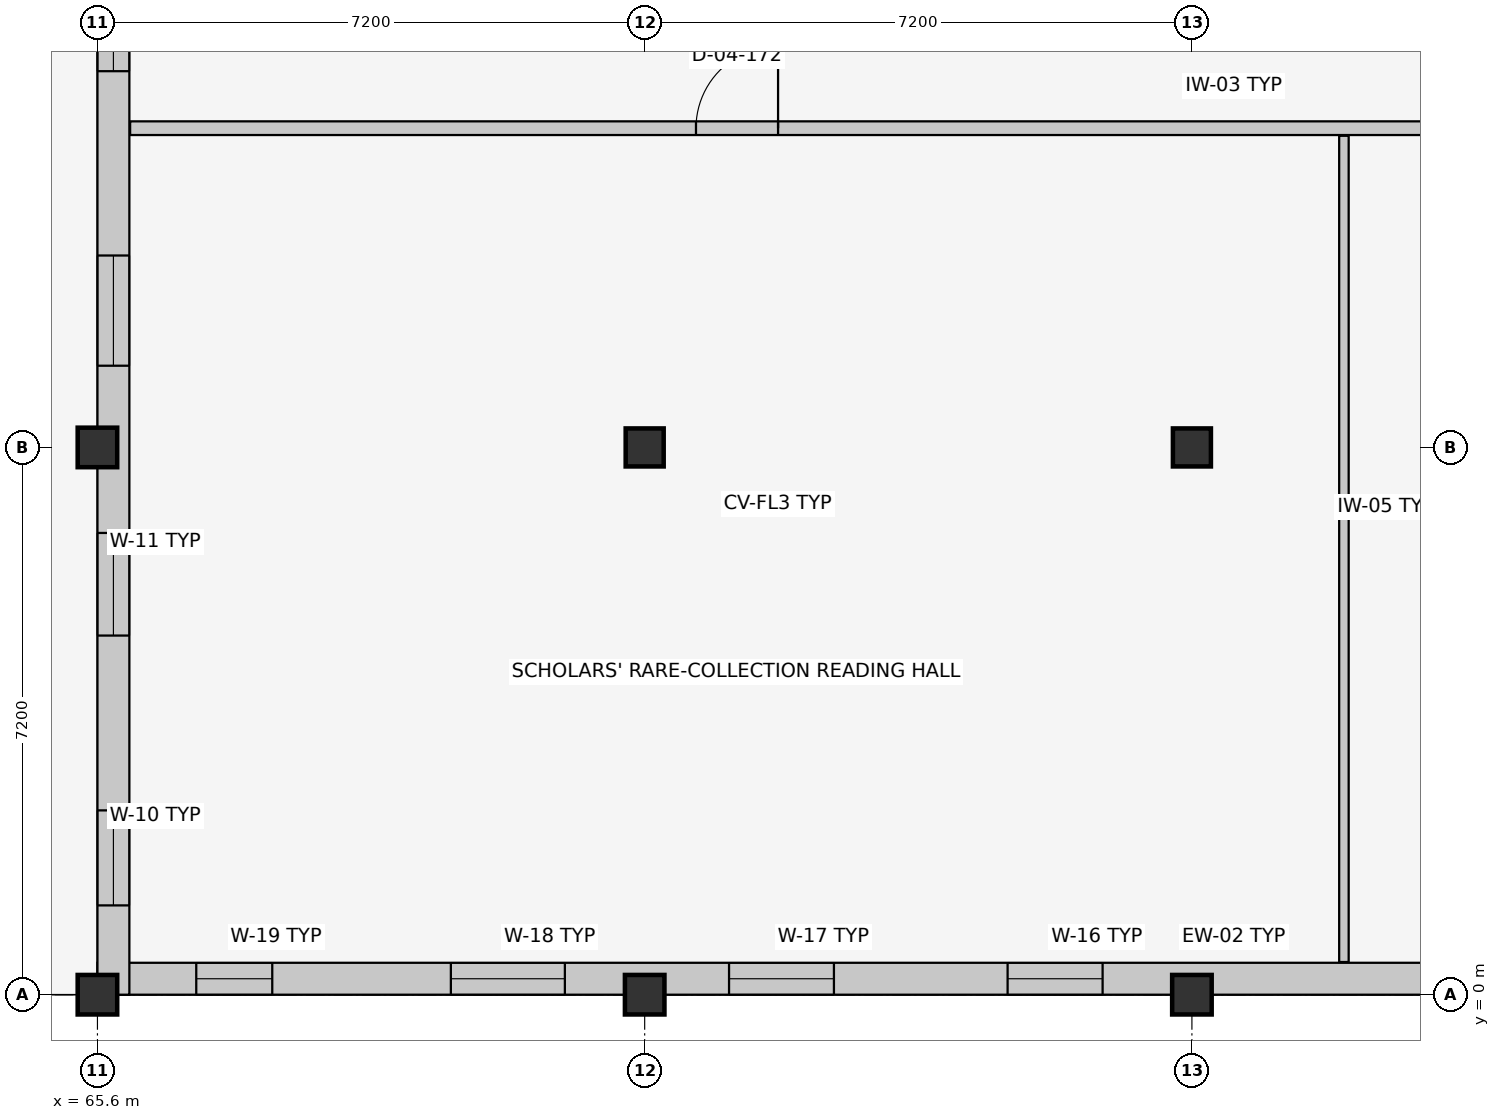
"""IFC4 building model, lengths in metres.
Left out: names, types, materials, properties, quantities, classifications, styles, units other than length and angle.
Written with IfcOpenShell. Run it as: python <this file> out.ifc"""

import sys

from ifc_helpers import new_model, si_unit, direction, frame, frame_2d, origin, origin_2d, place, context, subcontext, project, spatial, rectangle, extrude, element, fill, save


model = new_model("IFC4")
c1 = context("Model", 3, precision=1e-05, world=origin(), true_north=direction((0.0, 1.0)))
c2 = subcontext(c1, "Body", "Model", "MODEL_VIEW")
j1 = project(units=[si_unit("LENGTHUNIT", "METRE"), si_unit("PLANEANGLEUNIT", "RADIAN")], contexts=[c1])
p1 = place(None, origin())
s1 = spatial("IfcSite", under=j1, at=p1, CompositionType="ELEMENT")
p2 = place(p1, origin())
s2 = spatial("IfcBuilding", under=s1, at=p2, CompositionType="ELEMENT")
p3 = place(p2, frame((0.0, 0.0, 18.0)))
s3 = spatial("IfcBuildingStorey", under=s2, at=p3, CompositionType="ELEMENT", Elevation=18.0)
for number, where, z_axis, x_axis in (
    (1, (65.6, 0.0, 0.0), (0.0, 0.0, 1.0), (1.0, 0.0, 0.0)),
    (2, (65.6, 7.2, 0.0), (0.0, 0.0, 1.0), (1.0, 0.0, 0.0)),
    (3, (72.8, 0.0, 0.0), (0.0, 0.0, 1.0), (1.0, 0.0, 0.0)),
):
    element("IfcColumn", number, at=place(p3, frame(where, z_axis=z_axis, x_axis=x_axis)), inside=s3, PredefinedType="COLUMN", context=c2, shape_type="SweptSolid", body=[
        extrude(rectangle(XDim=0.52, YDim=0.52, at=origin_2d()), origin(), (0.0, 0.0, 1.0), 3.9),
    ])
p4 = place(p3, frame((72.8, 7.2, 0.0), z_axis=(0.0, 0.0, 1.0), x_axis=(1.0, 0.0, 0.0)))
e4 = element("IfcColumn", 4, at=p4, inside=s3, PredefinedType="COLUMN", context=c2, shape_type="SweptSolid", body=[
    extrude(rectangle(XDim=0.5, YDim=0.5, at=origin_2d()), origin(), (0.0, 0.0, 1.0), 3.9),
])
p5 = place(p3, frame((80.0, 0.0, 0.0), z_axis=(0.0, 0.0, 1.0), x_axis=(1.0, 0.0, 0.0)))
e5 = element("IfcColumn", 5, at=p5, inside=s3, PredefinedType="COLUMN", context=c2, shape_type="SweptSolid", body=[
    extrude(rectangle(XDim=0.52, YDim=0.52, at=origin_2d()), origin(), (0.0, 0.0, 1.0), 3.9),
])
p6 = place(p3, frame((80.0, 7.2, 0.0), z_axis=(0.0, 0.0, 1.0), x_axis=(1.0, 0.0, 0.0)))
e6 = element("IfcColumn", 6, at=p6, inside=s3, PredefinedType="COLUMN", context=c2, shape_type="SweptSolid", body=[
    extrude(rectangle(XDim=0.5, YDim=0.5, at=origin_2d()), origin(), (0.0, 0.0, 1.0), 3.9),
])
p7 = place(p3, frame((94.4, 0.21, 0.0), z_axis=(0.0, 0.0, 1.0), x_axis=(-1.0, 0.0, 0.0)))
e7 = element("IfcWall", 7, at=p7, inside=s3, PredefinedType="SOLIDWALL", context=c2, shape_type="SweptSolid", body=[
    extrude(rectangle(XDim=28.8, YDim=0.42, at=frame_2d((14.4, 0.0))), origin(), (0.0, 0.0, 1.0), 2.955),
])
p8 = place(p7, frame((1.075, 0.0, 0.9)))
e8 = element("IfcOpeningElement", 8, at=p8, cuts=e7, PredefinedType="OPENING", context=c2, shape_type="SweptSolid", body=[
    extrude(rectangle(XDim=1.45, YDim=1.45, at=frame_2d((0.725, 0.725))), frame((0.0, 0.222, 0.0), z_axis=(0.0, -1.0, 0.0), x_axis=(1.0, 0.0, 0.0)), (0.0, 0.0, 1.0), 0.444),
])
p9 = place(p7, frame((4.95, 0.0, 0.9)))
e9 = element("IfcOpeningElement", 9, at=p9, cuts=e7, PredefinedType="OPENING", context=c2, shape_type="SweptSolid", body=[
    extrude(rectangle(XDim=0.9, YDim=1.6, at=frame_2d((0.45, 0.8))), frame((0.0, 0.222, 0.0), z_axis=(0.0, -1.0, 0.0), x_axis=(1.0, 0.0, 0.0)), (0.0, 0.0, 1.0), 0.444),
])
p10 = place(p7, frame((8.475, 0.0, 0.9)))
e10 = element("IfcOpeningElement", 10, at=p10, cuts=e7, PredefinedType="OPENING", context=c2, shape_type="SweptSolid", body=[
    extrude(rectangle(XDim=1.05, YDim=1.6, at=frame_2d((0.525, 0.8))), frame((0.0, 0.222, 0.0), z_axis=(0.0, -1.0, 0.0), x_axis=(1.0, 0.0, 0.0)), (0.0, 0.0, 1.0), 0.444),
])
p11 = place(p7, frame((15.575, 0.0, 0.9)))
e11 = element("IfcOpeningElement", 11, at=p11, cuts=e7, PredefinedType="OPENING", context=c2, shape_type="SweptSolid", body=[
    extrude(rectangle(XDim=1.25, YDim=1.6, at=frame_2d((0.625, 0.8))), frame((0.0, 0.222, 0.0), z_axis=(0.0, -1.0, 0.0), x_axis=(1.0, 0.0, 0.0)), (0.0, 0.0, 1.0), 0.444),
])
p12 = place(p7, frame((19.11, 0.0, 0.9)))
e12 = element("IfcOpeningElement", 12, at=p12, cuts=e7, PredefinedType="OPENING", context=c2, shape_type="SweptSolid", body=[
    extrude(rectangle(XDim=1.38, YDim=1.6, at=frame_2d((0.69, 0.8))), frame((0.0, 0.222, 0.0), z_axis=(0.0, -1.0, 0.0), x_axis=(1.0, 0.0, 0.0)), (0.0, 0.0, 1.0), 0.444),
])
p13 = place(p7, frame((22.65, 0.0, 0.9)))
e13 = element("IfcOpeningElement", 13, at=p13, cuts=e7, PredefinedType="OPENING", context=c2, shape_type="SweptSolid", body=[
    extrude(rectangle(XDim=1.5, YDim=1.6, at=frame_2d((0.75, 0.8))), frame((0.0, 0.222, 0.0), z_axis=(0.0, -1.0, 0.0), x_axis=(1.0, 0.0, 0.0)), (0.0, 0.0, 1.0), 0.444),
])
p14 = place(p7, frame((26.5, 0.0, 0.9)))
e14 = element("IfcOpeningElement", 14, at=p14, cuts=e7, PredefinedType="OPENING", context=c2, shape_type="SweptSolid", body=[
    extrude(rectangle(XDim=1.0, YDim=1.75, at=frame_2d((0.5, 0.875))), frame((0.0, 0.222, 0.0), z_axis=(0.0, -1.0, 0.0), x_axis=(1.0, 0.0, 0.0)), (0.0, 0.0, 1.0), 0.444),
])
p15 = place(p3, frame((65.81, 0.0, 0.0), z_axis=(0.0, 0.0, 1.0), x_axis=(0.0, 1.0, 0.0)))
e15 = element("IfcWall", 15, at=p15, inside=s3, PredefinedType="SOLIDWALL", context=c2, shape_type="SweptSolid", body=[
    extrude(rectangle(XDim=21.6, YDim=0.42, at=frame_2d((10.8, 0.0))), origin(), (0.0, 0.0, 1.0), 3.055),
])
p16 = place(p15, frame((1.175, 0.0, 0.9)))
e16 = element("IfcOpeningElement", 16, at=p16, cuts=e15, PredefinedType="OPENING", context=c2, shape_type="SweptSolid", body=[
    extrude(rectangle(XDim=1.25, YDim=1.45, at=frame_2d((0.625, 0.725))), frame((0.0, 0.222, 0.0), z_axis=(0.0, -1.0, 0.0), x_axis=(1.0, 0.0, 0.0)), (0.0, 0.0, 1.0), 0.444),
])
p17 = place(p15, frame((4.725, 0.0, 0.9)))
e17 = element("IfcOpeningElement", 17, at=p17, cuts=e15, PredefinedType="OPENING", context=c2, shape_type="SweptSolid", body=[
    extrude(rectangle(XDim=1.35, YDim=1.45, at=frame_2d((0.675, 0.725))), frame((0.0, 0.222, 0.0), z_axis=(0.0, -1.0, 0.0), x_axis=(1.0, 0.0, 0.0)), (0.0, 0.0, 1.0), 0.444),
])
p18 = place(p15, frame((8.275, 0.0, 0.9)))
e18 = element("IfcOpeningElement", 18, at=p18, cuts=e15, PredefinedType="OPENING", context=c2, shape_type="SweptSolid", body=[
    extrude(rectangle(XDim=1.45, YDim=1.45, at=frame_2d((0.725, 0.725))), frame((0.0, 0.222, 0.0), z_axis=(0.0, -1.0, 0.0), x_axis=(1.0, 0.0, 0.0)), (0.0, 0.0, 1.0), 0.444),
])
p19 = place(p15, frame((12.15, 0.0, 0.9)))
e19 = element("IfcOpeningElement", 19, at=p19, cuts=e15, PredefinedType="OPENING", context=c2, shape_type="SweptSolid", body=[
    extrude(rectangle(XDim=0.9, YDim=1.6, at=frame_2d((0.45, 0.8))), frame((0.0, 0.222, 0.0), z_axis=(0.0, -1.0, 0.0), x_axis=(1.0, 0.0, 0.0)), (0.0, 0.0, 1.0), 0.444),
])
p20 = place(p15, frame((15.675, 0.0, 0.9)))
e20 = element("IfcOpeningElement", 20, at=p20, cuts=e15, PredefinedType="OPENING", context=c2, shape_type="SweptSolid", body=[
    extrude(rectangle(XDim=1.05, YDim=1.6, at=frame_2d((0.525, 0.8))), frame((0.0, 0.222, 0.0), z_axis=(0.0, -1.0, 0.0), x_axis=(1.0, 0.0, 0.0)), (0.0, 0.0, 1.0), 0.444),
])
p21 = place(p15, frame((19.225, 0.0, 0.9)))
e21 = element("IfcOpeningElement", 21, at=p21, cuts=e15, PredefinedType="OPENING", context=c2, shape_type="SweptSolid", body=[
    extrude(rectangle(XDim=1.15, YDim=1.6, at=frame_2d((0.575, 0.8))), frame((0.0, 0.222, 0.0), z_axis=(0.0, -1.0, 0.0), x_axis=(1.0, 0.0, 0.0)), (0.0, 0.0, 1.0), 0.444),
])
p22 = place(p3, frame((66.03, 11.4, 0.0), z_axis=(0.0, 0.0, 1.0), x_axis=(1.0, 0.0, 0.0)))
e22 = element("IfcWall", 22, at=p22, inside=s3, PredefinedType="PARTITIONING", context=c2, shape_type="SweptSolid", body=[
    extrude(rectangle(XDim=27.94, YDim=0.18, at=frame_2d((13.97, 0.0))), origin(), (0.0, 0.0, 1.0), 3.66),
])
p23 = place(p22, frame((7.445, 0.0, 0.0)))
e23 = element("IfcOpeningElement", 23, at=p23, cuts=e22, PredefinedType="OPENING", context=c2, shape_type="SweptSolid", body=[
    extrude(rectangle(XDim=1.08, YDim=2.15, at=frame_2d((0.54, 1.075))), frame((0.0, 0.102, 0.0), z_axis=(0.0, -1.0, 0.0), x_axis=(1.0, 0.0, 0.0)), (0.0, 0.0, 1.0), 0.204),
])
p24 = place(p22, frame((21.435, 0.0, 0.0)))
e24 = element("IfcOpeningElement", 24, at=p24, cuts=e22, PredefinedType="OPENING", context=c2, shape_type="SweptSolid", body=[
    extrude(rectangle(XDim=1.04, YDim=2.15, at=frame_2d((0.52, 1.075))), frame((0.0, 0.102, 0.0), z_axis=(0.0, -1.0, 0.0), x_axis=(1.0, 0.0, 0.0)), (0.0, 0.0, 1.0), 0.204),
])
p25 = place(p3, frame((82.0, 0.43, 0.0), z_axis=(0.0, 0.0, 1.0), x_axis=(0.0, 1.0, 0.0)))
e25 = element("IfcWall", 25, at=p25, inside=s3, PredefinedType="PARTITIONING", context=c2, shape_type="SweptSolid", body=[
    extrude(rectangle(XDim=10.87, YDim=0.125, at=frame_2d((5.435, 0.0))), origin(), (0.0, 0.0, 1.0), 3.66),
])
p26 = place(p11, origin())
e26 = element("IfcWindow", 26, at=p26, inside=s3, PartitioningType="SINGLE_PANEL", PredefinedType="WINDOW", context=c2, shape_type="SweptSolid", body=[
    extrude(rectangle(XDim=1.25, YDim=1.6, at=frame_2d((0.625, 0.8))), frame((0.0, 0.03, 0.0), z_axis=(0.0, -1.0, 0.0), x_axis=(1.0, 0.0, 0.0)), (0.0, 0.0, 1.0), 0.06),
])
fill(e11, e26)
p27 = place(p12, origin())
e27 = element("IfcWindow", 27, at=p27, inside=s3, PartitioningType="SINGLE_PANEL", PredefinedType="WINDOW", context=c2, shape_type="SweptSolid", body=[
    extrude(rectangle(XDim=1.38, YDim=1.6, at=frame_2d((0.69, 0.8))), frame((0.0, 0.03, 0.0), z_axis=(0.0, -1.0, 0.0), x_axis=(1.0, 0.0, 0.0)), (0.0, 0.0, 1.0), 0.06),
])
fill(e12, e27)
p28 = place(p13, origin())
e28 = element("IfcWindow", 28, at=p28, inside=s3, PartitioningType="SINGLE_PANEL", PredefinedType="WINDOW", context=c2, shape_type="SweptSolid", body=[
    extrude(rectangle(XDim=1.5, YDim=1.6, at=frame_2d((0.75, 0.8))), frame((0.0, 0.03, 0.0), z_axis=(0.0, -1.0, 0.0), x_axis=(1.0, 0.0, 0.0)), (0.0, 0.0, 1.0), 0.06),
])
fill(e13, e28)
p29 = place(p14, origin())
e29 = element("IfcWindow", 29, at=p29, inside=s3, PartitioningType="SINGLE_PANEL", PredefinedType="WINDOW", context=c2, shape_type="SweptSolid", body=[
    extrude(rectangle(XDim=1.0, YDim=1.75, at=frame_2d((0.5, 0.875))), frame((0.0, 0.03, 0.0), z_axis=(0.0, -1.0, 0.0), x_axis=(1.0, 0.0, 0.0)), (0.0, 0.0, 1.0), 0.06),
])
fill(e14, e29)
p30 = place(p16, origin())
e30 = element("IfcWindow", 30, at=p30, inside=s3, PartitioningType="SINGLE_PANEL", PredefinedType="WINDOW", context=c2, shape_type="SweptSolid", body=[
    extrude(rectangle(XDim=1.25, YDim=1.45, at=frame_2d((0.625, 0.725))), frame((0.0, 0.03, 0.0), z_axis=(0.0, -1.0, 0.0), x_axis=(1.0, 0.0, 0.0)), (0.0, 0.0, 1.0), 0.06),
])
fill(e16, e30)
p31 = place(p17, origin())
e31 = element("IfcWindow", 31, at=p31, inside=s3, PartitioningType="SINGLE_PANEL", PredefinedType="WINDOW", context=c2, shape_type="SweptSolid", body=[
    extrude(rectangle(XDim=1.35, YDim=1.45, at=frame_2d((0.675, 0.725))), frame((0.0, 0.03, 0.0), z_axis=(0.0, -1.0, 0.0), x_axis=(1.0, 0.0, 0.0)), (0.0, 0.0, 1.0), 0.06),
])
fill(e17, e31)
p32 = place(p18, origin())
e32 = element("IfcWindow", 32, at=p32, inside=s3, PartitioningType="SINGLE_PANEL", PredefinedType="WINDOW", context=c2, shape_type="SweptSolid", body=[
    extrude(rectangle(XDim=1.45, YDim=1.45, at=frame_2d((0.725, 0.725))), frame((0.0, 0.03, 0.0), z_axis=(0.0, -1.0, 0.0), x_axis=(1.0, 0.0, 0.0)), (0.0, 0.0, 1.0), 0.06),
])
fill(e18, e32)
p33 = place(p19, origin())
e33 = element("IfcWindow", 33, at=p33, inside=s3, PartitioningType="SINGLE_PANEL", PredefinedType="WINDOW", context=c2, shape_type="SweptSolid", body=[
    extrude(rectangle(XDim=0.9, YDim=1.6, at=frame_2d((0.45, 0.8))), frame((0.0, 0.03, 0.0), z_axis=(0.0, -1.0, 0.0), x_axis=(1.0, 0.0, 0.0)), (0.0, 0.0, 1.0), 0.06),
])
fill(e19, e33)
p34 = place(p23, origin())
e34 = element("IfcDoor", 34, at=p34, inside=s3, OperationType="SINGLE_SWING_RIGHT", PredefinedType="DOOR", context=c2, shape_type="SweptSolid", body=[
    extrude(rectangle(XDim=1.08, YDim=2.15, at=frame_2d((0.54, 1.075))), frame((0.0, 0.025, 0.0), z_axis=(0.0, -1.0, 0.0), x_axis=(1.0, 0.0, 0.0)), (0.0, 0.0, 1.0), 0.05),
])
fill(e23, e34)
save(model, sys.argv[1])
